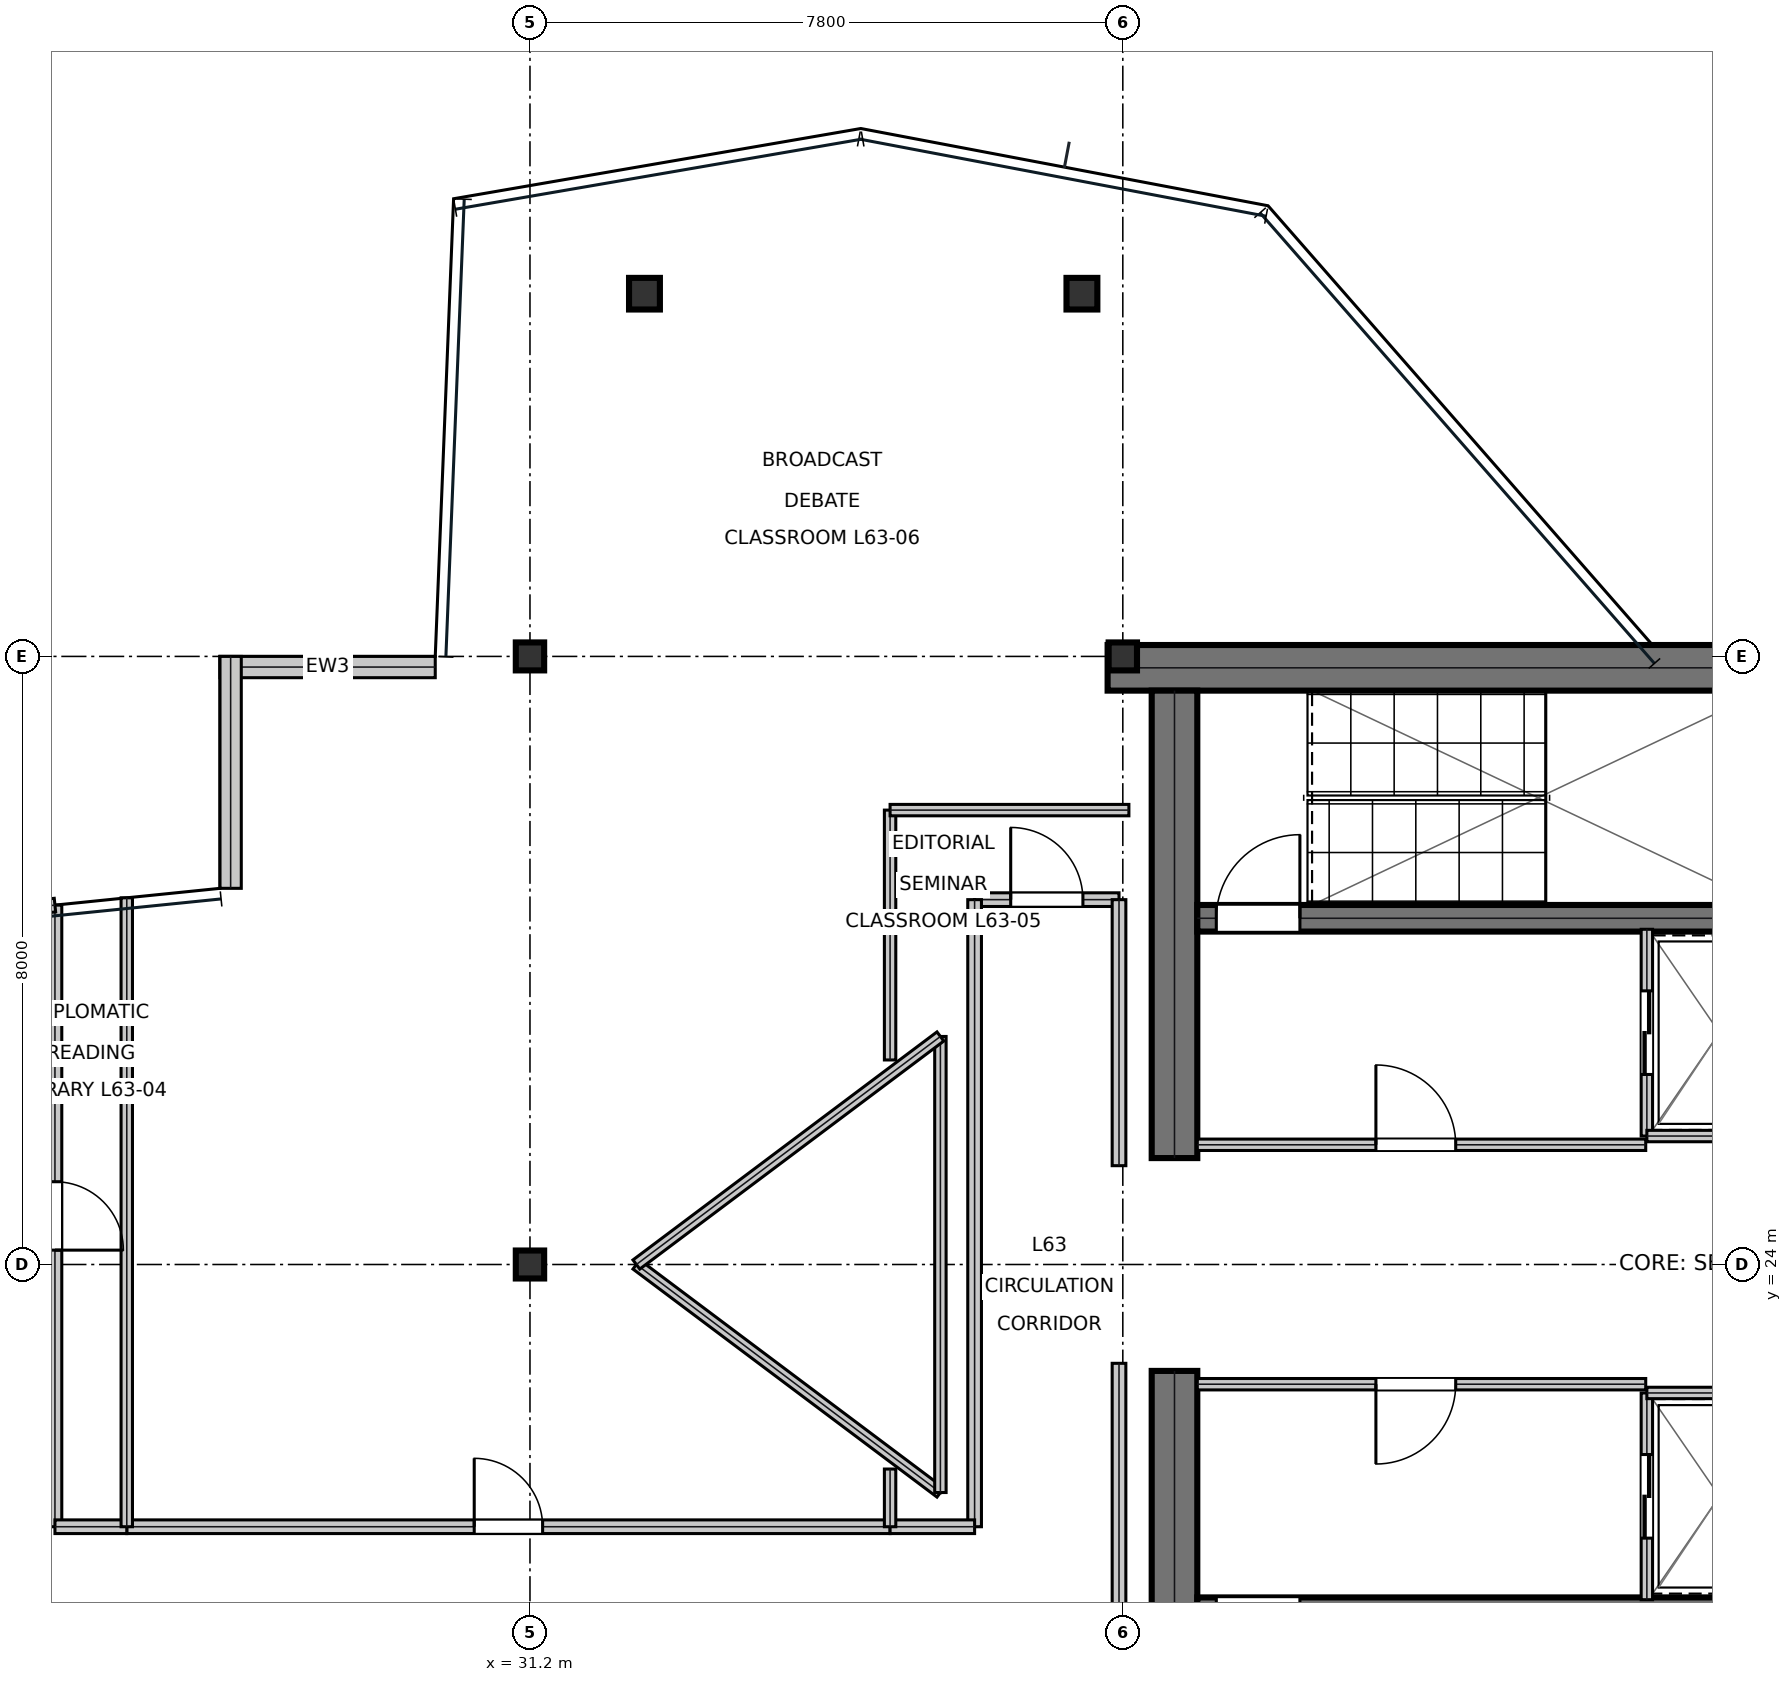
"""IFC4 building model, lengths in metres.
Left out: names, types, materials, properties, quantities, classifications, styles, units other than length and angle.
Written with IfcOpenShell. Run it as: python <this file> out.ifc"""

import sys

from ifc_helpers import new_model, si_unit, direction, frame, frame_2d, origin, origin_2d, place, context, subcontext, project, spatial, rectangle, i_section, extrude, element, fill, save


model = new_model("IFC4")
c1 = context("Model", 3, precision=1e-05, world=origin(), true_north=direction((0.0, 1.0)))
c2 = subcontext(c1, "Body", "Model", "MODEL_VIEW")
j1 = project(units=[si_unit("LENGTHUNIT", "METRE"), si_unit("PLANEANGLEUNIT", "RADIAN")], contexts=[c1])
p1 = place(None, origin())
s1 = spatial("IfcSite", under=j1, at=p1, CompositionType="ELEMENT")
p2 = place(p1, origin())
s2 = spatial("IfcBuilding", under=s1, at=p2, CompositionType="ELEMENT")
p3 = place(p2, frame((0.0, 0.0, 270.9)))
s3 = spatial("IfcBuildingStorey", under=s2, at=p3, CompositionType="ELEMENT", Elevation=270.9)
p4 = place(p3, frame((38.8, 31.85, 0.0), z_axis=(0.0, 0.0, 1.0), x_axis=(1.0, 0.0, 0.0)))
e1 = element("IfcWall", 1, at=p4, inside=s3, PredefinedType="SHEAR", context=c2, shape_type="SweptSolid", body=[
    extrude(rectangle(XDim=16.0, YDim=0.6, at=frame_2d((8.0, 0.0))), origin(), (0.0, 0.0, 1.0), 3.81),
])
for number, where, z_axis, x_axis in (
    (2, (39.68, 16.45, 0.0), (0.0, 0.0, 1.0), (0.0, 1.0, 0.0)),
    (3, (39.68, 25.4, 0.0), (0.0, 0.0, 1.0), (0.0, 1.0, 0.0)),
):
    element("IfcWall", number, at=place(p3, frame(where, z_axis=z_axis, x_axis=x_axis)), inside=s3, PredefinedType="SHEAR", context=c2, shape_type="SweptSolid", body=[
        extrude(rectangle(XDim=6.15, YDim=0.6, at=frame_2d((3.075, 0.0))), origin(), (0.0, 0.0, 1.0), 3.81),
    ])
p5 = place(p3, frame((39.98, 28.555, 0.0), z_axis=(0.0, 0.0, 1.0), x_axis=(1.0, 0.0, 0.0)))
e4 = element("IfcWall", 4, at=p5, inside=s3, PredefinedType="SHEAR", context=c2, shape_type="SweptSolid", body=[
    extrude(rectangle(XDim=7.71, YDim=0.35, at=frame_2d((3.855, 0.0))), origin(), (0.0, 0.0, 1.0), 3.81),
])
p6 = place(p5, frame((0.25, 0.0, 0.0)))
e5 = element("IfcOpeningElement", 5, at=p6, cuts=e4, PredefinedType="OPENING", context=c2, shape_type="SweptSolid", body=[
    extrude(rectangle(XDim=1.1, YDim=2.15, at=frame_2d((0.55, 1.075))), frame((0.0, 0.185, 0.0), z_axis=(0.0, -1.0, 0.0), x_axis=(1.0, 0.0, 0.0)), (0.0, 0.0, 1.0), 0.37),
])
p7 = place(p3, frame((39.98, 19.445, 0.0), z_axis=(0.0, 0.0, 1.0), x_axis=(1.0, 0.0, 0.0)))
e6 = element("IfcWall", 6, at=p7, inside=s3, PredefinedType="SHEAR", context=c2, shape_type="SweptSolid", body=[
    extrude(rectangle(XDim=7.71, YDim=0.35, at=frame_2d((3.855, 0.0))), origin(), (0.0, 0.0, 1.0), 3.81),
])
p8 = place(p7, frame((0.25, 0.0, 0.0)))
e7 = element("IfcOpeningElement", 7, at=p8, cuts=e6, PredefinedType="OPENING", context=c2, shape_type="SweptSolid", body=[
    extrude(rectangle(XDim=1.1, YDim=2.15, at=frame_2d((0.55, 1.075))), frame((0.0, 0.185, 0.0), z_axis=(0.0, -1.0, 0.0), x_axis=(1.0, 0.0, 0.0)), (0.0, 0.0, 1.0), 0.37),
])
for number, where, z_axis, x_axis in (
    (8, (31.2, 24.0, 0.0), (0.0, 0.0, 1.0), (1.0, 0.0, 0.0)),
    (9, (31.2, 32.0, 0.0), (0.0, 0.0, 1.0), (1.0, 0.0, 0.0)),
    (10, (39.0, 32.0, 0.0), (0.0, 0.0, 1.0), (1.0, 0.0, 0.0)),
):
    element("IfcColumn", number, at=place(p3, frame(where, z_axis=z_axis, x_axis=x_axis)), inside=s3, PredefinedType="COLUMN", context=c2, shape_type="SweptSolid", body=[
        extrude(i_section(OverallWidth=0.373, OverallDepth=0.368, WebThickness=0.015, FlangeThickness=0.024, at=origin_2d()), origin(), (0.0, 0.0, 1.0), 4.044),
    ])
for number, where, z_axis, x_axis in (
    (11, (32.706, 36.772, 0.016), (0.0, 0.0, 1.0), (1.0, 0.0, 0.0)),
    (12, (38.462, 36.772, 0.016), (0.0, 0.0, 1.0), (1.0, 0.0, 0.0)),
):
    element("IfcColumn", number, at=place(p3, frame(where, z_axis=z_axis, x_axis=x_axis)), inside=s3, PredefinedType="COLUMN", context=c2, shape_type="SweptSolid", body=[
        extrude(i_section(OverallWidth=0.406, OverallDepth=0.416, WebThickness=0.03, FlangeThickness=0.048, at=origin_2d()), origin(), (0.0, 0.0, 1.0), 4.018),
    ])
p9 = place(p3, frame((29.954, 31.86, 0.0), z_axis=(0.0, 0.0, 1.0), x_axis=(-1.0, 0.0, 0.0)))
e13 = element("IfcWall", 13, at=p9, inside=s3, PredefinedType="STANDARD", context=c2, shape_type="SweptSolid", body=[
    extrude(rectangle(XDim=2.832, YDim=0.28, at=frame_2d((1.416, 0.0))), origin(), (0.0, 0.0, 1.0), 3.81),
])
p10 = place(p3, frame((27.262, 32.0, 0.0), z_axis=(0.0, 0.0, 1.0), x_axis=(0.0, -1.0, 0.0)))
e14 = element("IfcWall", 14, at=p10, inside=s3, PredefinedType="STANDARD", context=c2, shape_type="SweptSolid", body=[
    extrude(rectangle(XDim=3.051, YDim=0.28, at=frame_2d((1.526, 0.0))), origin(), (0.0, 0.0, 1.0), 3.339),
])
p11 = place(p3, frame((39.98, 25.575, 0.0), z_axis=(0.0, 0.0, 1.0), x_axis=(1.0, 0.0, 0.0)))
e15 = element("IfcWall", 15, at=p11, inside=s3, PredefinedType="PARTITIONING", context=c2, shape_type="SweptSolid", body=[
    extrude(rectangle(XDim=5.9, YDim=0.15, at=frame_2d((2.95, 0.0))), origin(), (0.0, 0.0, 1.0), 3.81),
])
p12 = place(p11, frame((2.35, 0.0, 0.0)))
e16 = element("IfcOpeningElement", 16, at=p12, cuts=e15, PredefinedType="OPENING", context=c2, shape_type="SweptSolid", body=[
    extrude(rectangle(XDim=1.05, YDim=2.15, at=frame_2d((0.525, 1.075))), frame((0.0, 0.085, 0.0), z_axis=(0.0, -1.0, 0.0), x_axis=(1.0, 0.0, 0.0)), (0.0, 0.0, 1.0), 0.17),
])
p13 = place(p3, frame((39.98, 22.425, 0.0), z_axis=(0.0, 0.0, 1.0), x_axis=(1.0, 0.0, 0.0)))
e17 = element("IfcWall", 17, at=p13, inside=s3, PredefinedType="PARTITIONING", context=c2, shape_type="SweptSolid", body=[
    extrude(rectangle(XDim=5.9, YDim=0.15, at=frame_2d((2.95, 0.0))), origin(), (0.0, 0.0, 1.0), 3.81),
])
p14 = place(p13, frame((2.35, 0.0, 0.0)))
e18 = element("IfcOpeningElement", 18, at=p14, cuts=e17, PredefinedType="OPENING", context=c2, shape_type="SweptSolid", body=[
    extrude(rectangle(XDim=1.05, YDim=2.15, at=frame_2d((0.525, 1.075))), frame((0.0, 0.085, 0.0), z_axis=(0.0, -1.0, 0.0), x_axis=(1.0, 0.0, 0.0)), (0.0, 0.0, 1.0), 0.17),
])
p15 = place(p3, frame((45.895, 25.69, 0.0), z_axis=(0.0, 0.0, 1.0), x_axis=(0.0, 1.0, 0.0)))
e19 = element("IfcWall", 19, at=p15, inside=s3, PredefinedType="PARTITIONING", context=c2, shape_type="SweptSolid", body=[
    extrude(rectangle(XDim=2.72, YDim=0.15, at=frame_2d((1.36, 0.0))), origin(), (0.0, 0.0, 1.0), 3.81),
])
p16 = place(p15, frame((0.81, 0.0, 0.0)))
e20 = element("IfcOpeningElement", 20, at=p16, cuts=e19, PredefinedType="OPENING", context=c2, shape_type="SweptSolid", body=[
    extrude(rectangle(XDim=1.1, YDim=2.15, at=frame_2d((0.55, 1.075))), frame((0.0, 0.085, 0.0), z_axis=(0.0, -1.0, 0.0), x_axis=(1.0, 0.0, 0.0)), (0.0, 0.0, 1.0), 0.17),
])
p17 = place(p3, frame((45.895, 25.69, 0.0), z_axis=(0.0, 0.0, 1.0), x_axis=(1.0, 0.0, 0.0)))
e21 = element("IfcWall", 21, at=p17, inside=s3, PredefinedType="PARTITIONING", context=c2, shape_type="SweptSolid", body=[
    extrude(rectangle(XDim=1.915, YDim=0.15, at=frame_2d((0.958, 0.0))), origin(), (0.0, 0.0, 1.0), 3.81),
])
p18 = place(p3, frame((45.895, 19.59, 0.0), z_axis=(0.0, 0.0, 1.0), x_axis=(0.0, 1.0, 0.0)))
e22 = element("IfcWall", 22, at=p18, inside=s3, PredefinedType="PARTITIONING", context=c2, shape_type="SweptSolid", body=[
    extrude(rectangle(XDim=2.72, YDim=0.15, at=frame_2d((1.36, 0.0))), origin(), (0.0, 0.0, 1.0), 3.81),
])
p19 = place(p18, frame((0.81, 0.0, 0.0)))
e23 = element("IfcOpeningElement", 23, at=p19, cuts=e22, PredefinedType="OPENING", context=c2, shape_type="SweptSolid", body=[
    extrude(rectangle(XDim=1.1, YDim=2.15, at=frame_2d((0.55, 1.075))), frame((0.0, 0.085, 0.0), z_axis=(0.0, -1.0, 0.0), x_axis=(1.0, 0.0, 0.0)), (0.0, 0.0, 1.0), 0.17),
])
p20 = place(p3, frame((45.895, 22.31, 0.0), z_axis=(0.0, 0.0, 1.0), x_axis=(1.0, 0.0, 0.0)))
e24 = element("IfcWall", 24, at=p20, inside=s3, PredefinedType="PARTITIONING", context=c2, shape_type="SweptSolid", body=[
    extrude(rectangle(XDim=1.915, YDim=0.15, at=frame_2d((0.958, 0.0))), origin(), (0.0, 0.0, 1.0), 3.81),
])
p21 = place(p3, frame((24.95, 20.55, 0.0), z_axis=(0.0, 0.0, 1.0), x_axis=(0.0, 1.0, 0.0)))
e25 = element("IfcWall", 25, at=p21, inside=s3, PredefinedType="SOLIDWALL", context=c2, shape_type="SweptSolid", body=[
    extrude(rectangle(XDim=8.178, YDim=0.18, at=frame_2d((4.089, 0.0))), origin(), (0.0, 0.0, 1.0), 3.27),
])
p22 = place(p21, frame((3.639, 0.0, 0.0)))
e26 = element("IfcOpeningElement", 26, at=p22, cuts=e25, PredefinedType="OPENING", context=c2, shape_type="SweptSolid", body=[
    extrude(rectangle(XDim=0.9, YDim=2.15, at=frame_2d((0.45, 1.075))), frame((0.0, 0.1, 0.0), z_axis=(0.0, -1.0, 0.0), x_axis=(1.0, 0.0, 0.0)), (0.0, 0.0, 1.0), 0.2),
])
p23 = place(p3, frame((37.05, 28.8, 0.0), z_axis=(0.0, 0.0, 1.0), x_axis=(1.0, 0.0, 0.0)))
e27 = element("IfcWall", 27, at=p23, inside=s3, PredefinedType="SOLIDWALL", context=c2, shape_type="SweptSolid", body=[
    extrude(rectangle(XDim=1.9, YDim=0.18, at=frame_2d((0.95, 0.0))), origin(), (0.0, 0.0, 1.0), 3.81),
])
p24 = place(p23, frame((0.475, 0.0, 0.0)))
e28 = element("IfcOpeningElement", 28, at=p24, cuts=e27, PredefinedType="OPENING", context=c2, shape_type="SweptSolid", body=[
    extrude(rectangle(XDim=0.95, YDim=2.15, at=frame_2d((0.475, 1.075))), frame((0.0, 0.1, 0.0), z_axis=(0.0, -1.0, 0.0), x_axis=(1.0, 0.0, 0.0)), (0.0, 0.0, 1.0), 0.2),
])
p25 = place(p3, frame((25.895, 20.55, 0.0), z_axis=(0.0, 0.0, 1.0), x_axis=(1.0, 0.0, 0.0)))
e29 = element("IfcWall", 29, at=p25, inside=s3, PredefinedType="SOLIDWALL", context=c2, shape_type="SweptSolid", body=[
    extrude(rectangle(XDim=10.043, YDim=0.18, at=frame_2d((5.021, 0.0))), origin(), (0.0, 0.0, 1.0), 3.27),
])
p26 = place(p25, frame((4.572, 0.0, 0.0)))
e30 = element("IfcOpeningElement", 30, at=p26, cuts=e29, PredefinedType="OPENING", context=c2, shape_type="SweptSolid", body=[
    extrude(rectangle(XDim=0.9, YDim=2.15, at=frame_2d((0.45, 1.075))), frame((0.0, 0.1, 0.0), z_axis=(0.0, -1.0, 0.0), x_axis=(1.0, 0.0, 0.0)), (0.0, 0.0, 1.0), 0.2),
])
p27 = place(p3, frame((38.95, 18.8, 0.0), z_axis=(0.0, 0.0, 1.0), x_axis=(0.0, 1.0, 0.0)))
e31 = element("IfcWall", 31, at=p27, inside=s3, PredefinedType="SOLIDWALL", context=c2, shape_type="SweptSolid", body=[
    extrude(rectangle(XDim=3.9, YDim=0.18, at=frame_2d((1.95, 0.0))), origin(), (0.0, 0.0, 1.0), 3.54),
])
p28 = place(p3, frame((23.872, 28.618, 0.0), z_axis=(0.0, 0.0, 1.0), x_axis=(0.994866145346, 0.101199569384, 0.0)))
e32 = element("IfcWall", 32, at=p28, inside=s3, PredefinedType="SOLIDWALL", context=c2, shape_type="SweptSolid", body=[
    extrude(rectangle(XDim=1.083, YDim=0.18, at=frame_2d((0.542, 0.0))), origin(), (0.0, 0.0, 1.0), 3.81),
])
p29 = place(p3, frame((24.95, 20.55, 0.0), z_axis=(0.0, 0.0, 1.0), x_axis=(1.0, 0.0, 0.0)))
e33 = element("IfcWall", 33, at=p29, inside=s3, PredefinedType="SOLIDWALL", context=c2, shape_type="SweptSolid", body=[
    extrude(rectangle(XDim=0.945, YDim=0.18, at=frame_2d((0.473, 0.0))), origin(), (0.0, 0.0, 1.0), 3.81),
])
p30 = place(p3, frame((37.05, 20.55, 0.0), z_axis=(0.0, 0.0, 1.0), x_axis=(0.0, 1.0, 0.0)))
e34 = element("IfcWall", 34, at=p30, inside=s3, PredefinedType="SOLIDWALL", context=c2, shape_type="SweptSolid", body=[
    extrude(rectangle(XDim=8.25, YDim=0.18, at=frame_2d((4.125, 0.0))), origin(), (0.0, 0.0, 1.0), 3.54),
])
p31 = place(p3, frame((38.95, 25.3, 0.0), z_axis=(0.0, 0.0, 1.0), x_axis=(0.0, 1.0, 0.0)))
e35 = element("IfcWall", 35, at=p31, inside=s3, PredefinedType="SOLIDWALL", context=c2, shape_type="SweptSolid", body=[
    extrude(rectangle(XDim=3.5, YDim=0.18, at=frame_2d((1.75, 0.0))), origin(), (0.0, 0.0, 1.0), 3.54),
])
p32 = place(p3, frame((35.938, 20.55, 0.0), z_axis=(0.0, 0.0, 1.0), x_axis=(1.0, 0.0, 0.0)))
e36 = element("IfcWall", 36, at=p32, inside=s3, PredefinedType="SOLIDWALL", context=c2, shape_type="SweptSolid", body=[
    extrude(rectangle(XDim=1.112, YDim=0.18, at=frame_2d((0.556, 0.0))), origin(), (0.0, 0.0, 1.0), 3.54),
])
p33 = place(p3, frame((25.895, 20.55, 0.0), z_axis=(0.0, 0.0, 1.0), x_axis=(0.0, 1.0, 0.0)))
e37 = element("IfcWall", 37, at=p33, inside=s3, PredefinedType="MOVABLE", context=c2, shape_type="SweptSolid", body=[
    extrude(rectangle(XDim=8.274, YDim=0.15, at=frame_2d((4.137, 0.0))), origin(), (0.0, 0.0, 1.0), 3.27),
])
p34 = place(p3, frame((35.938, 26.691, 0.0), z_axis=(0.0, 0.0, 1.0), x_axis=(0.0, 1.0, 0.0)))
e38 = element("IfcWall", 38, at=p34, inside=s3, PredefinedType="MOVABLE", context=c2, shape_type="SweptSolid", body=[
    extrude(rectangle(XDim=3.287, YDim=0.15, at=frame_2d((1.644, 0.0))), origin(), (0.0, 0.0, 1.0), 3.54),
])
p35 = place(p3, frame((35.938, 29.978, 0.0), z_axis=(0.0, 0.0, 1.0), x_axis=(1.0, 0.0, 0.0)))
e39 = element("IfcWall", 39, at=p35, inside=s3, PredefinedType="MOVABLE", context=c2, shape_type="SweptSolid", body=[
    extrude(rectangle(XDim=3.142, YDim=0.15, at=frame_2d((1.571, 0.0))), origin(), (0.0, 0.0, 1.0), 3.54),
])
p36 = place(p3, frame((35.938, 20.55, 0.0), z_axis=(0.0, 0.0, 1.0), x_axis=(0.0, 1.0, 0.0)))
e40 = element("IfcWall", 40, at=p36, inside=s3, PredefinedType="MOVABLE", context=c2, shape_type="SweptSolid", body=[
    extrude(rectangle(XDim=0.759, YDim=0.15, at=frame_2d((0.379, 0.0))), origin(), (0.0, 0.0, 1.0), 3.81),
])
p37 = place(p3, frame((32.6, 24.0, 0.0), z_axis=(0.0, 0.0, 1.0), x_axis=(0.8, -0.6, 0.0)))
e41 = element("IfcWall", 41, at=p37, inside=s3, PredefinedType="MOVABLE", context=c2, shape_type="SweptSolid", body=[
    extrude(rectangle(XDim=5.0, YDim=0.15, at=frame_2d((2.5, 0.0))), origin(), (0.0, 0.0, 1.0), 3.81),
])
p38 = place(p3, frame((36.6, 21.0, 0.0), z_axis=(0.0, 0.0, 1.0), x_axis=(0.0, 1.0, 0.0)))
e42 = element("IfcWall", 42, at=p38, inside=s3, PredefinedType="MOVABLE", context=c2, shape_type="SweptSolid", body=[
    extrude(rectangle(XDim=6.0, YDim=0.15, at=frame_2d((3.0, 0.0))), origin(), (0.0, 0.0, 1.0), 3.81),
])
p39 = place(p3, frame((36.6, 27.0, 0.0), z_axis=(0.0, 0.0, 1.0), x_axis=(-0.8, -0.6, 0.0)))
e43 = element("IfcWall", 43, at=p39, inside=s3, PredefinedType="MOVABLE", context=c2, shape_type="SweptSolid", body=[
    extrude(rectangle(XDim=5.0, YDim=0.15, at=frame_2d((2.5, 0.0))), origin(), (0.0, 0.0, 1.0), 3.81),
])
p40 = place(p12, origin())
e44 = element("IfcDoor", 44, at=p40, inside=s3, OperationType="SINGLE_SWING_LEFT", PredefinedType="DOOR", context=c2, shape_type="SweptSolid", body=[
    extrude(rectangle(XDim=1.05, YDim=2.15, at=frame_2d((0.525, 1.075))), frame((0.0, 0.025, 0.0), z_axis=(0.0, -1.0, 0.0), x_axis=(1.0, 0.0, 0.0)), (0.0, 0.0, 1.0), 0.05),
])
fill(e16, e44)
p41 = place(p14, frame((1.05, 0.0, 0.0), z_axis=(0.0, 0.0, 1.0), x_axis=(-1.0, 0.0, 0.0)))
e45 = element("IfcDoor", 45, at=p41, inside=s3, OperationType="SINGLE_SWING_RIGHT", PredefinedType="DOOR", context=c2, shape_type="SweptSolid", body=[
    extrude(rectangle(XDim=1.05, YDim=2.15, at=frame_2d((0.525, 1.075))), frame((0.0, 0.025, 0.0), z_axis=(0.0, -1.0, 0.0), x_axis=(1.0, 0.0, 0.0)), (0.0, 0.0, 1.0), 0.05),
])
fill(e18, e45)
p42 = place(p16, frame((1.1, 0.0, 0.0), z_axis=(0.0, 0.0, 1.0), x_axis=(-1.0, 0.0, 0.0)))
e46 = element("IfcDoor", 46, at=p42, inside=s3, OperationType="DOUBLE_DOOR_SLIDING", PredefinedType="DOOR", context=c2, shape_type="SweptSolid", body=[
    extrude(rectangle(XDim=1.1, YDim=2.15, at=frame_2d((0.55, 1.075))), frame((0.0, 0.025, 0.0), z_axis=(0.0, -1.0, 0.0), x_axis=(1.0, 0.0, 0.0)), (0.0, 0.0, 1.0), 0.05),
])
fill(e20, e46)
p43 = place(p19, frame((1.1, 0.0, 0.0), z_axis=(0.0, 0.0, 1.0), x_axis=(-1.0, 0.0, 0.0)))
e47 = element("IfcDoor", 47, at=p43, inside=s3, OperationType="DOUBLE_DOOR_SLIDING", PredefinedType="DOOR", context=c2, shape_type="SweptSolid", body=[
    extrude(rectangle(XDim=1.1, YDim=2.15, at=frame_2d((0.55, 1.075))), frame((0.0, 0.025, 0.0), z_axis=(0.0, -1.0, 0.0), x_axis=(1.0, 0.0, 0.0)), (0.0, 0.0, 1.0), 0.05),
])
fill(e23, e47)
p44 = place(p22, frame((0.9, 0.0, 0.0), z_axis=(0.0, 0.0, 1.0), x_axis=(-1.0, 0.0, 0.0)))
e48 = element("IfcDoor", 48, at=p44, inside=s3, OperationType="SINGLE_SWING_RIGHT", PredefinedType="DOOR", context=c2, shape_type="SweptSolid", body=[
    extrude(rectangle(XDim=0.9, YDim=2.15, at=frame_2d((0.45, 1.075))), frame((0.0, 0.025, 0.0), z_axis=(0.0, -1.0, 0.0), x_axis=(1.0, 0.0, 0.0)), (0.0, 0.0, 1.0), 0.05),
])
fill(e26, e48)
p45 = place(p24, origin())
e49 = element("IfcDoor", 49, at=p45, inside=s3, OperationType="SINGLE_SWING_LEFT", PredefinedType="DOOR", context=c2, shape_type="SweptSolid", body=[
    extrude(rectangle(XDim=0.95, YDim=2.15, at=frame_2d((0.475, 1.075))), frame((0.0, 0.025, 0.0), z_axis=(0.0, -1.0, 0.0), x_axis=(1.0, 0.0, 0.0)), (0.0, 0.0, 1.0), 0.05),
])
fill(e28, e49)
p46 = place(p26, origin())
e50 = element("IfcDoor", 50, at=p46, inside=s3, OperationType="SINGLE_SWING_LEFT", PredefinedType="DOOR", context=c2, shape_type="SweptSolid", body=[
    extrude(rectangle(XDim=0.9, YDim=2.15, at=frame_2d((0.45, 1.075))), frame((0.0, 0.025, 0.0), z_axis=(0.0, -1.0, 0.0), x_axis=(1.0, 0.0, 0.0)), (0.0, 0.0, 1.0), 0.05),
])
fill(e30, e50)
p47 = place(p6, origin())
e51 = element("IfcDoor", 51, at=p47, inside=s3, OperationType="SINGLE_SWING_RIGHT", PredefinedType="DOOR", context=c2, shape_type="SweptSolid", body=[
    extrude(rectangle(XDim=1.1, YDim=2.15, at=frame_2d((0.55, 1.075))), frame((0.0, 0.025, 0.0), z_axis=(0.0, -1.0, 0.0), x_axis=(1.0, 0.0, 0.0)), (0.0, 0.0, 1.0), 0.05),
])
fill(e5, e51)
save(model, sys.argv[1])
